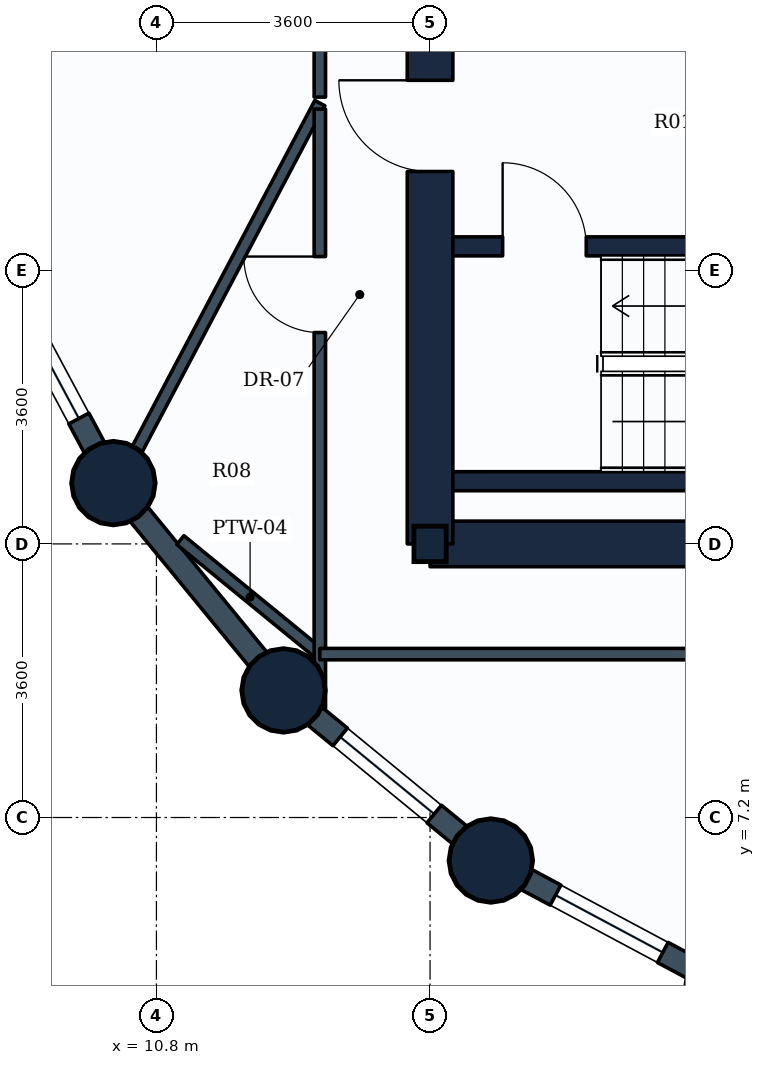
"""IFC4 building model, lengths in metres.
Left out: names, types, materials, properties, quantities, classifications, styles, units other than length and angle.
Written with IfcOpenShell. Run it as: python <this file> out.ifc"""

import sys

from ifc_helpers import new_model, si_unit, direction, frame, frame_2d, origin, origin_2d, place, context, subcontext, project, spatial, rectangle, circle, i_section, extrude, element, fill, save


model = new_model("IFC4")
c1 = context("Model", 3, precision=1e-05, world=origin(), true_north=direction((0.0, 1.0)))
c2 = subcontext(c1, "Body", "Model", "MODEL_VIEW")
j1 = project(units=[si_unit("LENGTHUNIT", "METRE"), si_unit("PLANEANGLEUNIT", "RADIAN")], contexts=[c1])
p1 = place(None, origin())
s1 = spatial("IfcSite", under=j1, at=p1, CompositionType="ELEMENT")
p2 = place(p1, origin())
s2 = spatial("IfcBuilding", under=s1, at=p2, CompositionType="ELEMENT")
p3 = place(p2, frame((0.0, 0.0, 103.5)))
s3 = spatial("IfcBuildingStorey", under=s2, at=p3, CompositionType="ELEMENT", Elevation=103.5)
for number, where, z_axis, x_axis in (
    (1, (10.234, 11.6, 0.0), (0.0, 0.0, 1.0), (1.0, 0.0, 0.0)),
    (2, (12.472, 8.872, 0.0), (0.0, 0.0, 1.0), (1.0, 0.0, 0.0)),
):
    element("IfcColumn", number, at=place(p3, frame(where, z_axis=z_axis, x_axis=x_axis)), inside=s3, PredefinedType="COLUMN", context=c2, shape_type="SweptSolid", body=[
        extrude(circle(Radius=0.55, at=origin_2d()), origin(), (0.0, 0.0, 1.0), 3.9),
    ])
p4 = place(p3, frame((14.4, 10.8, 0.0), z_axis=(0.0, 0.0, 1.0), x_axis=(1.0, 0.0, 0.0)))
e3 = element("IfcColumn", 3, at=p4, inside=s3, PredefinedType="COLUMN", context=c2, shape_type="SweptSolid", body=[
    extrude(i_section(OverallWidth=0.424, OverallDepth=0.467, WebThickness=0.033, FlangeThickness=0.053, FilletRadius=0.015, at=origin_2d()), origin(), (0.0, 0.0, 1.0), 3.9),
])
p5 = place(p3, frame((15.2, 6.634, 0.0), z_axis=(0.0, 0.0, 1.0), x_axis=(1.0, 0.0, 0.0)))
e4 = element("IfcColumn", 4, at=p5, inside=s3, PredefinedType="COLUMN", context=c2, shape_type="SweptSolid", body=[
    extrude(circle(Radius=0.55, at=origin_2d()), origin(), (0.0, 0.0, 1.0), 3.9),
])
p6 = place(p3, frame((10.234, 11.6, 0.0), z_axis=(0.0, 0.0, 1.0), x_axis=(-0.47151087309, 0.881860247748, 0.0)))
e5 = element("IfcWall", 5, at=p6, inside=s3, PredefinedType="STANDARD", context=c2, shape_type="SweptSolid", body=[
    extrude(rectangle(XDim=3.529, YDim=0.3, at=frame_2d((1.764, 0.0))), origin(), (0.0, 0.0, 1.0), 2.93),
])
p7 = place(p6, frame((0.964, 0.0, 0.85)))
e6 = element("IfcOpeningElement", 6, at=p7, cuts=e5, PredefinedType="OPENING", context=c2, shape_type="SweptSolid", body=[
    extrude(rectangle(XDim=1.6, YDim=1.35, at=frame_2d((0.8, 0.675))), frame((0.0, 0.16, 0.0), z_axis=(0.0, -1.0, 0.0), x_axis=(1.0, 0.0, 0.0)), (0.0, 0.0, 1.0), 0.32),
])
p8 = place(p3, frame((12.472, 8.872, 0.0), z_axis=(0.0, 0.0, 1.0), x_axis=(-0.634258295121, 0.773121216285, 0.0)))
e7 = element("IfcWall", 7, at=p8, inside=s3, PredefinedType="STANDARD", context=c2, shape_type="SweptSolid", body=[
    extrude(rectangle(XDim=3.529, YDim=0.3, at=frame_2d((1.764, 0.0))), origin(), (0.0, 0.0, 1.0), 2.93),
])
p9 = place(p3, frame((15.2, 6.634, 0.0), z_axis=(0.0, 0.0, 1.0), x_axis=(-0.773121216285, 0.634258295121, 0.0)))
e8 = element("IfcWall", 8, at=p9, inside=s3, PredefinedType="STANDARD", context=c2, shape_type="SweptSolid", body=[
    extrude(rectangle(XDim=3.529, YDim=0.3, at=frame_2d((1.764, 0.0))), origin(), (0.0, 0.0, 1.0), 2.93),
])
p10 = place(p9, frame((0.964, 0.0, 0.85)))
e9 = element("IfcOpeningElement", 9, at=p10, cuts=e8, PredefinedType="OPENING", context=c2, shape_type="SweptSolid", body=[
    extrude(rectangle(XDim=1.6, YDim=1.35, at=frame_2d((0.8, 0.675))), frame((0.0, 0.16, 0.0), z_axis=(0.0, -1.0, 0.0), x_axis=(1.0, 0.0, 0.0)), (0.0, 0.0, 1.0), 0.32),
])
p11 = place(p3, frame((18.312, 4.97, 0.0), z_axis=(0.0, 0.0, 1.0), x_axis=(-0.881846862014, 0.471535907389, 0.0)))
e10 = element("IfcWall", 10, at=p11, inside=s3, PredefinedType="STANDARD", context=c2, shape_type="SweptSolid", body=[
    extrude(rectangle(XDim=3.529, YDim=0.3, at=frame_2d((1.765, 0.0))), origin(), (0.0, 0.0, 1.0), 2.93),
])
p12 = place(p11, frame((0.964, 0.0, 0.85)))
e11 = element("IfcOpeningElement", 11, at=p12, cuts=e10, PredefinedType="OPENING", context=c2, shape_type="SweptSolid", body=[
    extrude(rectangle(XDim=1.6, YDim=1.35, at=frame_2d((0.8, 0.675))), frame((0.0, 0.16, 0.0), z_axis=(0.0, -1.0, 0.0), x_axis=(1.0, 0.0, 0.0)), (0.0, 0.0, 1.0), 0.32),
])
p13 = place(p3, frame((14.4, 10.8, 0.0), z_axis=(0.0, 0.0, 1.0), x_axis=(1.0, 0.0, 0.0)))
e12 = element("IfcWall", 12, at=p13, inside=s3, PredefinedType="SHEAR", context=c2, shape_type="SweptSolid", body=[
    extrude(rectangle(XDim=18.0, YDim=0.6, at=frame_2d((9.0, 0.0))), origin(), (0.0, 0.0, 1.0), 3.65),
])
p14 = place(p3, frame((14.4, 10.8, 0.0), z_axis=(0.0, 0.0, 1.0), x_axis=(0.0, 1.0, 0.0)))
e13 = element("IfcWall", 13, at=p14, inside=s3, PredefinedType="SHEAR", context=c2, shape_type="SweptSolid", body=[
    extrude(rectangle(XDim=14.4, YDim=0.6, at=frame_2d((7.2, 0.0))), origin(), (0.0, 0.0, 1.0), 3.65),
])
p15 = place(p14, frame((11.05, 0.0, 0.0)))
e14 = element("IfcOpeningElement", 14, at=p15, cuts=e13, PredefinedType="OPENING", context=c2, shape_type="SweptSolid", body=[
    extrude(rectangle(XDim=1.1, YDim=2.1, at=frame_2d((0.55, 1.05))), frame((0.0, 0.31, 0.0), z_axis=(0.0, -1.0, 0.0), x_axis=(1.0, 0.0, 0.0)), (0.0, 0.0, 1.0), 0.62),
])
p16 = place(p14, frame((4.9, 0.0, 0.0)))
e15 = element("IfcOpeningElement", 15, at=p16, cuts=e13, PredefinedType="OPENING", context=c2, shape_type="SweptSolid", body=[
    extrude(rectangle(XDim=1.2, YDim=2.1, at=frame_2d((0.6, 1.05))), frame((0.0, 0.31, 0.0), z_axis=(0.0, -1.0, 0.0), x_axis=(1.0, 0.0, 0.0)), (0.0, 0.0, 1.0), 0.62),
])
p17 = place(p3, frame((14.7, 11.625, 0.0), z_axis=(0.0, 0.0, 1.0), x_axis=(1.0, 0.0, 0.0)))
e16 = element("IfcWall", 16, at=p17, inside=s3, PredefinedType="SHEAR", context=c2, shape_type="SweptSolid", body=[
    extrude(rectangle(XDim=8.65, YDim=0.25, at=frame_2d((4.325, 0.0))), origin(), (0.0, 0.0, 1.0), 3.65),
])
p18 = place(p3, frame((14.7, 14.715, 0.0), z_axis=(0.0, 0.0, 1.0), x_axis=(1.0, 0.0, 0.0)))
e17 = element("IfcWall", 17, at=p18, inside=s3, PredefinedType="SHEAR", context=c2, shape_type="SweptSolid", body=[
    extrude(rectangle(XDim=8.65, YDim=0.25, at=frame_2d((4.325, 0.0))), origin(), (0.0, 0.0, 1.0), 3.65),
])
p19 = place(p18, frame((0.655, 0.0, 0.0)))
e18 = element("IfcOpeningElement", 18, at=p19, cuts=e17, PredefinedType="OPENING", context=c2, shape_type="SweptSolid", body=[
    extrude(rectangle(XDim=1.1, YDim=2.1, at=frame_2d((0.55, 1.05))), frame((0.0, 0.135, 0.0), z_axis=(0.0, -1.0, 0.0), x_axis=(1.0, 0.0, 0.0)), (0.0, 0.0, 1.0), 0.27),
])
p20 = place(p3, frame((12.95, 9.35, 0.0), z_axis=(0.0, 0.0, 1.0), x_axis=(-0.774315108081, 0.632800216022, 0.0)))
e19 = element("IfcWall", 19, at=p20, inside=s3, PredefinedType="PARTITIONING", context=c2, shape_type="SweptSolid", body=[
    extrude(rectangle(XDim=2.37, YDim=0.15, at=frame_2d((1.185, 0.0))), origin(), (0.0, 0.0, 1.0), 2.93),
])
p21 = place(p3, frame((12.95, 16.6, 0.0), z_axis=(0.0, 0.0, 1.0), x_axis=(-0.466710911312, -0.884409930554, 0.0)))
e20 = element("IfcWall", 20, at=p21, inside=s3, PredefinedType="PARTITIONING", context=c2, shape_type="SweptSolid", body=[
    extrude(rectangle(XDim=5.559, YDim=0.15, at=frame_2d((2.78, 0.0))), origin(), (0.0, 0.0, 1.0), 2.93),
])
p22 = place(p3, frame((12.95, 16.679, 0.0), z_axis=(0.0, 0.0, 1.0), x_axis=(0.0, 1.0, 0.0)))
e21 = element("IfcWall", 21, at=p22, inside=s3, PredefinedType="PARTITIONING", context=c2, shape_type="SweptSolid", body=[
    extrude(rectangle(XDim=8.442, YDim=0.15, at=frame_2d((4.221, 0.0))), origin(), (0.0, 0.0, 1.0), 3.19),
])
p23 = place(p22, frame((3.721, 0.0, 0.0)))
e22 = element("IfcOpeningElement", 22, at=p23, cuts=e21, PredefinedType="OPENING", context=c2, shape_type="SweptSolid", body=[
    extrude(rectangle(XDim=1.0, YDim=2.1, at=frame_2d((0.5, 1.05))), frame((0.0, 0.085, 0.0), z_axis=(0.0, -1.0, 0.0), x_axis=(1.0, 0.0, 0.0)), (0.0, 0.0, 1.0), 0.17),
])
p24 = place(p3, frame((12.95, 8.634, 0.0), z_axis=(0.0, 0.0, 1.0), x_axis=(0.0, 1.0, 0.0)))
e23 = element("IfcWall", 23, at=p24, inside=s3, PredefinedType="PARTITIONING", context=c2, shape_type="SweptSolid", body=[
    extrude(rectangle(XDim=7.887, YDim=0.15, at=frame_2d((3.944, 0.0))), origin(), (0.0, 0.0, 1.0), 2.93),
])
p25 = place(p24, frame((4.947, 0.0, 0.0)))
e24 = element("IfcOpeningElement", 24, at=p25, cuts=e23, PredefinedType="OPENING", context=c2, shape_type="SweptSolid", body=[
    extrude(rectangle(XDim=1.0, YDim=2.1, at=frame_2d((0.5, 1.05))), frame((0.0, 0.085, 0.0), z_axis=(0.0, -1.0, 0.0), x_axis=(1.0, 0.0, 0.0)), (0.0, 0.0, 1.0), 0.17),
])
p26 = place(p3, frame((12.95, 9.35, 0.0), z_axis=(0.0, 0.0, 1.0), x_axis=(1.0, 0.0, 0.0)))
e25 = element("IfcWall", 25, at=p26, inside=s3, PredefinedType="PARTITIONING", context=c2, shape_type="SweptSolid", body=[
    extrude(rectangle(XDim=15.771, YDim=0.15, at=frame_2d((7.885, 0.0))), origin(), (0.0, 0.0, 1.0), 3.18),
])
p27 = place(p26, frame((4.836, 0.0, 0.0)))
e26 = element("IfcOpeningElement", 26, at=p27, cuts=e25, PredefinedType="OPENING", context=c2, shape_type="SweptSolid", body=[
    extrude(rectangle(XDim=1.0, YDim=2.1, at=frame_2d((0.5, 1.05))), frame((0.0, 0.085, 0.0), z_axis=(0.0, -1.0, 0.0), x_axis=(1.0, 0.0, 0.0)), (0.0, 0.0, 1.0), 0.17),
])
p28 = place(p7, origin())
e27 = element("IfcWindow", 27, at=p28, inside=s3, PartitioningType="SINGLE_PANEL", PredefinedType="WINDOW", context=c2, shape_type="SweptSolid", body=[
    extrude(rectangle(XDim=1.6, YDim=1.35, at=frame_2d((0.8, 0.675))), frame((0.0, 0.03, 0.0), z_axis=(0.0, -1.0, 0.0), x_axis=(1.0, 0.0, 0.0)), (0.0, 0.0, 1.0), 0.06),
])
fill(e6, e27)
p29 = place(p10, origin())
e28 = element("IfcWindow", 28, at=p29, inside=s3, PartitioningType="SINGLE_PANEL", PredefinedType="WINDOW", context=c2, shape_type="SweptSolid", body=[
    extrude(rectangle(XDim=1.6, YDim=1.35, at=frame_2d((0.8, 0.675))), frame((0.0, 0.03, 0.0), z_axis=(0.0, -1.0, 0.0), x_axis=(1.0, 0.0, 0.0)), (0.0, 0.0, 1.0), 0.06),
])
fill(e9, e28)
p30 = place(p12, origin())
e29 = element("IfcWindow", 29, at=p30, inside=s3, PartitioningType="SINGLE_PANEL", PredefinedType="WINDOW", context=c2, shape_type="SweptSolid", body=[
    extrude(rectangle(XDim=1.6, YDim=1.35, at=frame_2d((0.8, 0.675))), frame((0.0, 0.03, 0.0), z_axis=(0.0, -1.0, 0.0), x_axis=(1.0, 0.0, 0.0)), (0.0, 0.0, 1.0), 0.06),
])
fill(e11, e29)
p31 = place(p19, origin())
e30 = element("IfcDoor", 30, at=p31, inside=s3, OperationType="SINGLE_SWING_LEFT", PredefinedType="DOOR", context=c2, shape_type="SweptSolid", body=[
    extrude(rectangle(XDim=1.1, YDim=2.1, at=frame_2d((0.55, 1.05))), frame((0.0, 0.025, 0.0), z_axis=(0.0, -1.0, 0.0), x_axis=(1.0, 0.0, 0.0)), (0.0, 0.0, 1.0), 0.05),
])
fill(e18, e30)
p32 = place(p16, origin())
e31 = element("IfcDoor", 31, at=p32, inside=s3, OperationType="SINGLE_SWING_RIGHT", PredefinedType="DOOR", context=c2, shape_type="SweptSolid", body=[
    extrude(rectangle(XDim=1.2, YDim=2.1, at=frame_2d((0.6, 1.05))), frame((0.0, 0.025, 0.0), z_axis=(0.0, -1.0, 0.0), x_axis=(1.0, 0.0, 0.0)), (0.0, 0.0, 1.0), 0.05),
])
fill(e15, e31)
p33 = place(p25, origin())
e32 = element("IfcDoor", 32, at=p33, inside=s3, OperationType="SINGLE_SWING_RIGHT", PredefinedType="DOOR", context=c2, shape_type="SweptSolid", body=[
    extrude(rectangle(XDim=1.0, YDim=2.1, at=frame_2d((0.5, 1.05))), frame((0.0, 0.025, 0.0), z_axis=(0.0, -1.0, 0.0), x_axis=(1.0, 0.0, 0.0)), (0.0, 0.0, 1.0), 0.05),
])
fill(e24, e32)
save(model, sys.argv[1])
